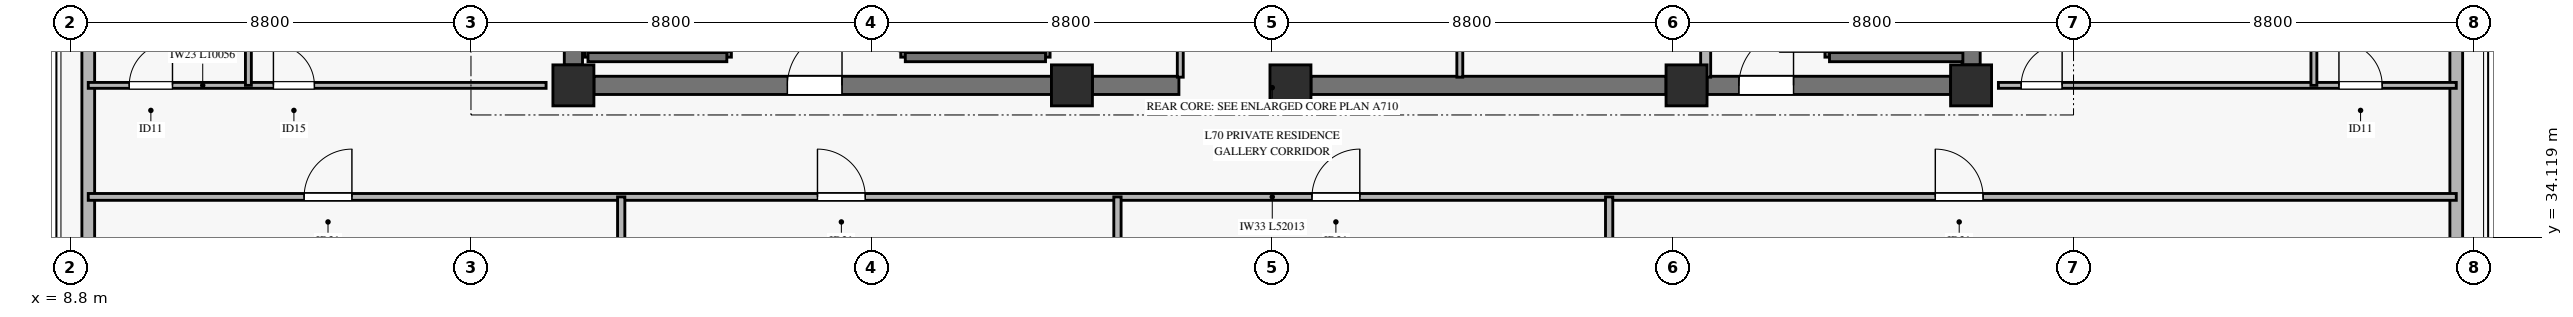
"""IFC4 building model, lengths in metres.
Left out: names, types, materials, properties, quantities, classifications, styles, units other than length and angle.
Written with IfcOpenShell. Run it as: python <this file> out.ifc"""

import sys

from ifc_helpers import new_model, si_unit, direction, frame, frame_2d, origin, origin_2d, place, context, subcontext, project, spatial, rectangle, extrude, source, transform, mapped, element, fill, save


model = new_model("IFC4")
c1 = context("Model", 3, precision=1e-05, world=origin(), true_north=direction((0.0, 1.0)))
c2 = subcontext(c1, "Body", "Model", "MODEL_VIEW")
j1 = project(units=[si_unit("LENGTHUNIT", "METRE"), si_unit("PLANEANGLEUNIT", "RADIAN")], contexts=[c1])
p1 = place(None, origin())
s1 = spatial("IfcSite", under=j1, at=p1, CompositionType="ELEMENT")
p2 = place(p1, origin())
s2 = spatial("IfcBuilding", under=s1, at=p2, CompositionType="ELEMENT")
p3 = place(p2, frame((0.0, 0.0, 272.3)))
s3 = spatial("IfcBuildingStorey", under=s2, at=p3, CompositionType="ELEMENT", Elevation=272.3)
m1 = source(origin(), c2, "Body", "SweptSolid", [
    extrude(rectangle(XDim=0.9, YDim=0.9, at=origin_2d()), origin(), (0.0, 0.0, 1.0), 3.185),
])
for number, where, z_axis, x_axis in (
    (1, (19.85, 37.45, 0.0), (0.0, 0.0, 1.0), (1.0, 0.0, 0.0)),
    (2, (30.8, 37.45, 0.0), (0.0, 0.0, 1.0), (1.0, 0.0, 0.0)),
    (3, (35.6, 37.45, 0.0), (0.0, 0.0, 1.0), (1.0, 0.0, 0.0)),
    (4, (44.3, 37.45, 0.0), (0.0, 0.0, 1.0), (1.0, 0.0, 0.0)),
    (5, (50.55, 37.45, 0.0), (0.0, 0.0, 1.0), (1.0, 0.0, 0.0)),
):
    element("IfcColumn", number, at=place(p3, frame(where, z_axis=z_axis, x_axis=x_axis)), inside=s3, PredefinedType="PILASTER", context=c2, shape_type="MappedRepresentation", body=[
        mapped(m1, transform((0.0, 0.0, 0.0), x_axis=(1.0, 0.0, 0.0), y_axis=(0.0, 1.0, 0.0), z_axis=(0.0, 0.0, 1.0), scale=1.0)),
    ])
p4 = place(p3, frame((20.3, 37.45, 0.0), z_axis=(0.0, 0.0, 1.0), x_axis=(1.0, 0.0, 0.0)))
e6 = element("IfcWall", 6, at=p4, inside=s3, PredefinedType="SHEAR", context=c2, shape_type="SweptSolid", body=[
    extrude(rectangle(XDim=10.05, YDim=0.4, at=frame_2d((5.025, 0.0))), origin(), (0.0, 0.0, 1.0), 3.185),
])
p5 = place(p4, frame((4.25, 0.0, 0.0)))
e7 = element("IfcOpeningElement", 7, at=p5, cuts=e6, PredefinedType="OPENING", context=c2, shape_type="SweptSolid", body=[
    extrude(rectangle(XDim=1.2, YDim=2.15, at=frame_2d((0.6, 1.075))), frame((0.0, 0.21, 0.0), z_axis=(0.0, -1.0, 0.0), x_axis=(1.0, 0.0, 0.0)), (0.0, 0.0, 1.0), 0.42),
])
p6 = place(p3, frame((31.25, 37.45, 0.0), z_axis=(0.0, 0.0, 1.0), x_axis=(1.0, 0.0, 0.0)))
e8 = element("IfcWall", 8, at=p6, inside=s3, PredefinedType="SHEAR", context=c2, shape_type="SweptSolid", body=[
    extrude(rectangle(XDim=1.9, YDim=0.4, at=frame_2d((0.95, 0.0))), origin(), (0.0, 0.0, 1.0), 3.185),
])
p7 = place(p3, frame((36.05, 37.45, 0.0), z_axis=(0.0, 0.0, 1.0), x_axis=(1.0, 0.0, 0.0)))
e9 = element("IfcWall", 9, at=p7, inside=s3, PredefinedType="SHEAR", context=c2, shape_type="SweptSolid", body=[
    extrude(rectangle(XDim=7.8, YDim=0.4, at=frame_2d((3.9, 0.0))), origin(), (0.0, 0.0, 1.0), 3.185),
])
p8 = place(p3, frame((44.75, 37.45, 0.0), z_axis=(0.0, 0.0, 1.0), x_axis=(1.0, 0.0, 0.0)))
e10 = element("IfcWall", 10, at=p8, inside=s3, PredefinedType="SHEAR", context=c2, shape_type="SweptSolid", body=[
    extrude(rectangle(XDim=5.35, YDim=0.4, at=frame_2d((2.675, 0.0))), origin(), (0.0, 0.0, 1.0), 3.185),
])
p9 = place(p8, frame((0.7, 0.0, 0.0)))
e11 = element("IfcOpeningElement", 11, at=p9, cuts=e10, PredefinedType="OPENING", context=c2, shape_type="SweptSolid", body=[
    extrude(rectangle(XDim=1.2, YDim=2.15, at=frame_2d((0.6, 1.075))), frame((0.0, 0.21, 0.0), z_axis=(0.0, -1.0, 0.0), x_axis=(1.0, 0.0, 0.0)), (0.0, 0.0, 1.0), 0.42),
])
for number, where, z_axis, x_axis in (
    (12, (19.85, 37.9, 0.0), (0.0, 0.0, 1.0), (0.0, 1.0, 0.0)),
    (13, (50.55, 37.9, 0.0), (0.0, 0.0, 1.0), (0.0, 1.0, 0.0)),
):
    element("IfcWall", number, at=place(p3, frame(where, z_axis=z_axis, x_axis=x_axis)), inside=s3, PredefinedType="SHEAR", context=c2, shape_type="SweptSolid", body=[
        extrude(rectangle(XDim=8.2, YDim=0.4, at=frame_2d((4.1, 0.0))), origin(), (0.0, 0.0, 1.0), 3.185),
    ])
p10 = place(p3, frame((9.194, 31.763, 0.0), z_axis=(0.0, 0.0, 1.0), x_axis=(0.0, 1.0, 0.0)))
e14 = element("IfcWall", 14, at=p10, inside=s3, PredefinedType="SOLIDWALL", context=c2, shape_type="SweptSolid", body=[
    extrude(rectangle(XDim=11.814, YDim=0.28, at=frame_2d((5.907, 0.0))), origin(), (0.0, 0.0, 1.0), 2.815),
])
p11 = place(p10, frame((7.049, 0.0, 0.45)))
e15 = element("IfcOpeningElement", 15, at=p11, cuts=e14, PredefinedType="OPENING", context=c2, shape_type="SweptSolid", body=[
    extrude(rectangle(XDim=2.2, YDim=2.1, at=frame_2d((1.1, 1.05))), frame((0.0, 0.15, 0.0), z_axis=(0.0, -1.0, 0.0), x_axis=(1.0, 0.0, 0.0)), (0.0, 0.0, 1.0), 0.3),
])
p12 = place(p3, frame((61.207, 31.763, 0.0), z_axis=(0.0, 0.0, 1.0), x_axis=(0.0, 1.0, 0.0)))
e16 = element("IfcWall", 16, at=p12, inside=s3, PredefinedType="SOLIDWALL", context=c2, shape_type="SweptSolid", body=[
    extrude(rectangle(XDim=11.814, YDim=0.28, at=frame_2d((5.907, 0.0))), origin(), (0.0, 0.0, 1.0), 2.815),
])
p13 = place(p12, frame((7.049, 0.0, 0.45)))
e17 = element("IfcOpeningElement", 17, at=p13, cuts=e16, PredefinedType="OPENING", context=c2, shape_type="SweptSolid", body=[
    extrude(rectangle(XDim=2.2, YDim=2.1, at=frame_2d((1.1, 1.05))), frame((0.0, 0.15, 0.0), z_axis=(0.0, -1.0, 0.0), x_axis=(1.0, 0.0, 0.0)), (0.0, 0.0, 1.0), 0.3),
])
p14 = place(p3, frame((20.17, 38.07, 0.0), z_axis=(0.0, 0.0, 1.0), x_axis=(0.0, 1.0, 0.0)))
e18 = element("IfcWall", 18, at=p14, inside=s3, PredefinedType="SOLIDWALL", context=c2, shape_type="SweptSolid", body=[
    extrude(rectangle(XDim=7.25, YDim=0.14, at=frame_2d((3.625, 0.0))), origin(), (0.0, 0.0, 1.0), 3.4),
])
p15 = place(p3, frame((23.22, 38.07, 0.0), z_axis=(0.0, 0.0, 1.0), x_axis=(0.0, 1.0, 0.0)))
e19 = element("IfcWall", 19, at=p15, inside=s3, PredefinedType="SOLIDWALL", context=c2, shape_type="SweptSolid", body=[
    extrude(rectangle(XDim=7.25, YDim=0.2, at=frame_2d((3.625, 0.0))), origin(), (0.0, 0.0, 1.0), 3.4),
])
p16 = place(p15, frame((0.11, 0.0, 0.0)))
e20 = element("IfcOpeningElement", 20, at=p16, cuts=e19, PredefinedType="OPENING", context=c2, shape_type="SweptSolid", body=[
    extrude(rectangle(XDim=1.1, YDim=2.15, at=frame_2d((0.55, 1.075))), frame((0.0, 0.11, 0.0), z_axis=(0.0, -1.0, 0.0), x_axis=(1.0, 0.0, 0.0)), (0.0, 0.0, 1.0), 0.22),
])
p17 = place(p3, frame((20.17, 38.07, 0.0), z_axis=(0.0, 0.0, 1.0), x_axis=(1.0, 0.0, 0.0)))
e21 = element("IfcWall", 21, at=p17, inside=s3, PredefinedType="SOLIDWALL", context=c2, shape_type="SweptSolid", body=[
    extrude(rectangle(XDim=3.05, YDim=0.2, at=frame_2d((1.525, 0.0))), origin(), (0.0, 0.0, 1.0), 3.4),
])
p18 = place(p3, frame((27.14, 38.07, 0.0), z_axis=(0.0, 0.0, 1.0), x_axis=(0.0, 1.0, 0.0)))
e22 = element("IfcWall", 22, at=p18, inside=s3, PredefinedType="SOLIDWALL", context=c2, shape_type="SweptSolid", body=[
    extrude(rectangle(XDim=7.25, YDim=0.2, at=frame_2d((3.625, 0.0))), origin(), (0.0, 0.0, 1.0), 3.4),
])
p19 = place(p18, frame((0.11, 0.0, 0.0)))
e23 = element("IfcOpeningElement", 23, at=p19, cuts=e22, PredefinedType="OPENING", context=c2, shape_type="SweptSolid", body=[
    extrude(rectangle(XDim=1.1, YDim=2.15, at=frame_2d((0.55, 1.075))), frame((0.0, 0.11, 0.0), z_axis=(0.0, -1.0, 0.0), x_axis=(1.0, 0.0, 0.0)), (0.0, 0.0, 1.0), 0.22),
])
p20 = place(p3, frame((30.22, 38.07, 0.0), z_axis=(0.0, 0.0, 1.0), x_axis=(0.0, 1.0, 0.0)))
e24 = element("IfcWall", 24, at=p20, inside=s3, PredefinedType="SOLIDWALL", context=c2, shape_type="SweptSolid", body=[
    extrude(rectangle(XDim=7.25, YDim=0.2, at=frame_2d((3.625, 0.0))), origin(), (0.0, 0.0, 1.0), 3.4),
])
p21 = place(p3, frame((27.14, 38.07, 0.0), z_axis=(0.0, 0.0, 1.0), x_axis=(1.0, 0.0, 0.0)))
e25 = element("IfcWall", 25, at=p21, inside=s3, PredefinedType="SOLIDWALL", context=c2, shape_type="SweptSolid", body=[
    extrude(rectangle(XDim=3.08, YDim=0.2, at=frame_2d((1.54, 0.0))), origin(), (0.0, 0.0, 1.0), 3.4),
])
p22 = place(p3, frame((47.44, 38.07, 0.0), z_axis=(0.0, 0.0, 1.0), x_axis=(0.0, 1.0, 0.0)))
e26 = element("IfcWall", 26, at=p22, inside=s3, PredefinedType="SOLIDWALL", context=c2, shape_type="SweptSolid", body=[
    extrude(rectangle(XDim=7.25, YDim=0.2, at=frame_2d((3.625, 0.0))), origin(), (0.0, 0.0, 1.0), 3.4),
])
p23 = place(p22, frame((0.11, 0.0, 0.0)))
e27 = element("IfcOpeningElement", 27, at=p23, cuts=e26, PredefinedType="OPENING", context=c2, shape_type="SweptSolid", body=[
    extrude(rectangle(XDim=1.1, YDim=2.15, at=frame_2d((0.55, 1.075))), frame((0.0, 0.11, 0.0), z_axis=(0.0, -1.0, 0.0), x_axis=(1.0, 0.0, 0.0)), (0.0, 0.0, 1.0), 0.22),
])
p24 = place(p3, frame((47.44, 38.07, 0.0), z_axis=(0.0, 0.0, 1.0), x_axis=(1.0, 0.0, 0.0)))
e28 = element("IfcWall", 28, at=p24, inside=s3, PredefinedType="SOLIDWALL", context=c2, shape_type="SweptSolid", body=[
    extrude(rectangle(XDim=2.93, YDim=0.2, at=frame_2d((1.465, 0.0))), origin(), (0.0, 0.0, 1.0), 3.4),
])
p25 = place(p3, frame((44.72, 37.63, 0.0), z_axis=(0.0, 0.0, 1.0), x_axis=(0.0, 1.0, 0.0)))
e29 = element("IfcWall", 29, at=p25, inside=s3, PredefinedType="SOLIDWALL", context=c2, shape_type="SweptSolid", body=[
    extrude(rectangle(XDim=7.59, YDim=0.22, at=frame_2d((3.795, 0.0))), origin(), (0.0, 0.0, 1.0), 3.185),
])
p26 = place(p3, frame((33.18, 37.63, 0.0), z_axis=(0.0, 0.0, 1.0), x_axis=(0.0, 1.0, 0.0)))
e30 = element("IfcWall", 30, at=p26, inside=s3, PredefinedType="PARTITIONING", context=c2, shape_type="SweptSolid", body=[
    extrude(rectangle(XDim=6.52, YDim=0.13, at=frame_2d((3.26, 0.0))), origin(), (0.0, 0.0, 1.0), 2.27),
])
p27 = place(p26, frame((2.27, 0.0, 0.0)))
e31 = element("IfcOpeningElement", 31, at=p27, cuts=e30, PredefinedType="OPENING", context=c2, shape_type="SweptSolid", body=[
    extrude(rectangle(XDim=0.9, YDim=2.1, at=frame_2d((0.45, 1.05))), frame((0.0, 0.075, 0.0), z_axis=(0.0, -1.0, 0.0), x_axis=(1.0, 0.0, 0.0)), (0.0, 0.0, 1.0), 0.15),
])
p28 = place(p3, frame((39.32, 37.63, 0.0), z_axis=(0.0, 0.0, 1.0), x_axis=(0.0, 1.0, 0.0)))
e32 = element("IfcWall", 32, at=p28, inside=s3, PredefinedType="PARTITIONING", context=c2, shape_type="SweptSolid", body=[
    extrude(rectangle(XDim=8.74, YDim=0.13, at=frame_2d((4.37, 0.0))), origin(), (0.0, 0.0, 1.0), 3.185),
])
p29 = place(p28, frame((4.89, 0.0, 0.0)))
e33 = element("IfcOpeningElement", 33, at=p29, cuts=e32, PredefinedType="OPENING", context=c2, shape_type="SweptSolid", body=[
    extrude(rectangle(XDim=0.9, YDim=2.1, at=frame_2d((0.45, 1.05))), frame((0.0, 0.075, 0.0), z_axis=(0.0, -1.0, 0.0), x_axis=(1.0, 0.0, 0.0)), (0.0, 0.0, 1.0), 0.15),
])
p30 = place(p3, frame((9.194, 35.0, 0.0), z_axis=(0.0, 0.0, 1.0), x_axis=(1.0, 0.0, 0.0)))
e34 = element("IfcWall", 34, at=p30, inside=s3, PredefinedType="PARTITIONING", context=c2, shape_type="SweptSolid", body=[
    extrude(rectangle(XDim=52.013, YDim=0.15, at=frame_2d((26.006, 0.0))), origin(), (0.0, 0.0, 1.0), 2.47),
])
p31 = place(p30, frame((4.741, 0.0, 0.0)))
e35 = element("IfcOpeningElement", 35, at=p31, cuts=e34, PredefinedType="OPENING", context=c2, shape_type="SweptSolid", body=[
    extrude(rectangle(XDim=1.05, YDim=2.15, at=frame_2d((0.525, 1.075))), frame((0.0, 0.085, 0.0), z_axis=(0.0, -1.0, 0.0), x_axis=(1.0, 0.0, 0.0)), (0.0, 0.0, 1.0), 0.17),
])
p32 = place(p30, frame((16.017, 0.0, 0.0)))
e36 = element("IfcOpeningElement", 36, at=p32, cuts=e34, PredefinedType="OPENING", context=c2, shape_type="SweptSolid", body=[
    extrude(rectangle(XDim=1.05, YDim=2.15, at=frame_2d((0.525, 1.075))), frame((0.0, 0.085, 0.0), z_axis=(0.0, -1.0, 0.0), x_axis=(1.0, 0.0, 0.0)), (0.0, 0.0, 1.0), 0.17),
])
p33 = place(p30, frame((26.879, 0.0, 0.0)))
e37 = element("IfcOpeningElement", 37, at=p33, cuts=e34, PredefinedType="OPENING", context=c2, shape_type="SweptSolid", body=[
    extrude(rectangle(XDim=1.05, YDim=2.15, at=frame_2d((0.525, 1.075))), frame((0.0, 0.085, 0.0), z_axis=(0.0, -1.0, 0.0), x_axis=(1.0, 0.0, 0.0)), (0.0, 0.0, 1.0), 0.17),
])
p34 = place(p30, frame((40.57, 0.0, 0.0)))
e38 = element("IfcOpeningElement", 38, at=p34, cuts=e34, PredefinedType="OPENING", context=c2, shape_type="SweptSolid", body=[
    extrude(rectangle(XDim=1.05, YDim=2.15, at=frame_2d((0.525, 1.075))), frame((0.0, 0.085, 0.0), z_axis=(0.0, -1.0, 0.0), x_axis=(1.0, 0.0, 0.0)), (0.0, 0.0, 1.0), 0.17),
])
for number, where, z_axis, x_axis in (
    (39, (20.9, 16.976, 0.0), (0.0, 0.0, 1.0), (0.0, 1.0, 0.0)),
    (40, (31.8, 16.976, 0.0), (0.0, 0.0, 1.0), (0.0, 1.0, 0.0)),
    (41, (42.6, 16.976, 0.0), (0.0, 0.0, 1.0), (0.0, 1.0, 0.0)),
):
    element("IfcWall", number, at=place(p3, frame(where, z_axis=z_axis, x_axis=x_axis)), inside=s3, PredefinedType="PARTITIONING", context=c2, shape_type="SweptSolid", body=[
        extrude(rectangle(XDim=18.024, YDim=0.16, at=frame_2d((9.012, 0.0))), origin(), (0.0, 0.0, 1.0), 2.77),
    ])
p35 = place(p3, frame((9.194, 37.45, 0.0), z_axis=(0.0, 0.0, 1.0), x_axis=(1.0, 0.0, 0.0)))
e42 = element("IfcWall", 42, at=p35, inside=s3, PredefinedType="PARTITIONING", context=c2, shape_type="SweptSolid", body=[
    extrude(rectangle(XDim=10.056, YDim=0.13, at=frame_2d((5.028, 0.0))), origin(), (0.0, 0.0, 1.0), 2.82),
])
p36 = place(p35, frame((0.9, 0.0, 0.0)))
e43 = element("IfcOpeningElement", 43, at=p36, cuts=e42, PredefinedType="OPENING", context=c2, shape_type="SweptSolid", body=[
    extrude(rectangle(XDim=0.95, YDim=2.1, at=frame_2d((0.475, 1.05))), frame((0.0, 0.075, 0.0), z_axis=(0.0, -1.0, 0.0), x_axis=(1.0, 0.0, 0.0)), (0.0, 0.0, 1.0), 0.15),
])
p37 = place(p35, frame((4.067, 0.0, 0.0)))
e44 = element("IfcOpeningElement", 44, at=p37, cuts=e42, PredefinedType="OPENING", context=c2, shape_type="SweptSolid", body=[
    extrude(rectangle(XDim=0.9, YDim=2.1, at=frame_2d((0.45, 1.05))), frame((0.0, 0.075, 0.0), z_axis=(0.0, -1.0, 0.0), x_axis=(1.0, 0.0, 0.0)), (0.0, 0.0, 1.0), 0.15),
])
p38 = place(p3, frame((12.711, 37.45, 0.0), z_axis=(0.0, 0.0, 1.0), x_axis=(0.0, 1.0, 0.0)))
e45 = element("IfcWall", 45, at=p38, inside=s3, PredefinedType="PARTITIONING", context=c2, shape_type="SweptSolid", body=[
    extrude(rectangle(XDim=8.8, YDim=0.13, at=frame_2d((4.4, 0.0))), origin(), (0.0, 0.0, 1.0), 3.185),
])
p39 = place(p3, frame((51.15, 37.45, 0.0), z_axis=(0.0, 0.0, 1.0), x_axis=(1.0, 0.0, 0.0)))
e46 = element("IfcWall", 46, at=p39, inside=s3, PredefinedType="PARTITIONING", context=c2, shape_type="SweptSolid", body=[
    extrude(rectangle(XDim=10.057, YDim=0.13, at=frame_2d((5.029, 0.0))), origin(), (0.0, 0.0, 1.0), 2.82),
])
p40 = place(p39, frame((0.5, 0.0, 0.0)))
e47 = element("IfcOpeningElement", 47, at=p40, cuts=e46, PredefinedType="OPENING", context=c2, shape_type="SweptSolid", body=[
    extrude(rectangle(XDim=0.9, YDim=2.1, at=frame_2d((0.45, 1.05))), frame((0.0, 0.075, 0.0), z_axis=(0.0, -1.0, 0.0), x_axis=(1.0, 0.0, 0.0)), (0.0, 0.0, 1.0), 0.15),
])
p41 = place(p39, frame((7.48, 0.0, 0.0)))
e48 = element("IfcOpeningElement", 48, at=p41, cuts=e46, PredefinedType="OPENING", context=c2, shape_type="SweptSolid", body=[
    extrude(rectangle(XDim=0.95, YDim=2.1, at=frame_2d((0.475, 1.05))), frame((0.0, 0.075, 0.0), z_axis=(0.0, -1.0, 0.0), x_axis=(1.0, 0.0, 0.0)), (0.0, 0.0, 1.0), 0.15),
])
p42 = place(p3, frame((58.08, 37.45, 0.0), z_axis=(0.0, 0.0, 1.0), x_axis=(0.0, 1.0, 0.0)))
e49 = element("IfcWall", 49, at=p42, inside=s3, PredefinedType="PARTITIONING", context=c2, shape_type="SweptSolid", body=[
    extrude(rectangle(XDim=8.8, YDim=0.13, at=frame_2d((4.4, 0.0))), origin(), (0.0, 0.0, 1.0), 3.185),
])
m2 = source(origin(), c2, "Body", "SweptSolid", [
    extrude(rectangle(XDim=1.2, YDim=2.15, at=frame_2d((0.6, 1.075))), frame((0.0, 0.025, 0.0), z_axis=(0.0, -1.0, 0.0), x_axis=(1.0, 0.0, 0.0)), (0.0, 0.0, 1.0), 0.05),
])
p43 = place(p5, origin())
e50 = element("IfcDoor", 50, at=p43, inside=s3, OperationType="SINGLE_SWING_RIGHT", PredefinedType="DOOR", context=c2, shape_type="MappedRepresentation", body=[
    mapped(m2, transform((0.0, 0.0, 0.0), x_axis=(1.0, 0.0, 0.0), y_axis=(0.0, 1.0, 0.0), z_axis=(0.0, 0.0, 1.0), scale=1.0)),
])
fill(e7, e50)
p44 = place(p9, origin())
e51 = element("IfcDoor", 51, at=p44, inside=s3, OperationType="SINGLE_SWING_RIGHT", PredefinedType="DOOR", context=c2, shape_type="MappedRepresentation", body=[
    mapped(m2, transform((0.0, 0.0, 0.0), x_axis=(1.0, 0.0, 0.0), y_axis=(0.0, 1.0, 0.0), z_axis=(0.0, 0.0, 1.0), scale=1.0)),
])
fill(e11, e51)
m3 = source(origin(), c2, "Body", "SweptSolid", [
    extrude(rectangle(XDim=1.05, YDim=2.15, at=frame_2d((0.525, 1.075))), frame((0.0, 0.025, 0.0), z_axis=(0.0, -1.0, 0.0), x_axis=(1.0, 0.0, 0.0)), (0.0, 0.0, 1.0), 0.05),
])
p45 = place(p31, origin())
e52 = element("IfcDoor", 52, at=p45, inside=s3, OperationType="SINGLE_SWING_RIGHT", PredefinedType="DOOR", context=c2, shape_type="MappedRepresentation", body=[
    mapped(m3, transform((0.0, 0.0, 0.0), x_axis=(1.0, 0.0, 0.0), y_axis=(0.0, 1.0, 0.0), z_axis=(0.0, 0.0, 1.0), scale=1.0)),
])
fill(e35, e52)
p46 = place(p32, origin())
e53 = element("IfcDoor", 53, at=p46, inside=s3, OperationType="SINGLE_SWING_LEFT", PredefinedType="DOOR", context=c2, shape_type="MappedRepresentation", body=[
    mapped(m3, transform((0.0, 0.0, 0.0), x_axis=(1.0, 0.0, 0.0), y_axis=(0.0, 1.0, 0.0), z_axis=(0.0, 0.0, 1.0), scale=1.0)),
])
fill(e36, e53)
p47 = place(p33, origin())
e54 = element("IfcDoor", 54, at=p47, inside=s3, OperationType="SINGLE_SWING_RIGHT", PredefinedType="DOOR", context=c2, shape_type="MappedRepresentation", body=[
    mapped(m3, transform((0.0, 0.0, 0.0), x_axis=(1.0, 0.0, 0.0), y_axis=(0.0, 1.0, 0.0), z_axis=(0.0, 0.0, 1.0), scale=1.0)),
])
fill(e37, e54)
p48 = place(p34, origin())
e55 = element("IfcDoor", 55, at=p48, inside=s3, OperationType="SINGLE_SWING_LEFT", PredefinedType="DOOR", context=c2, shape_type="MappedRepresentation", body=[
    mapped(m3, transform((0.0, 0.0, 0.0), x_axis=(1.0, 0.0, 0.0), y_axis=(0.0, 1.0, 0.0), z_axis=(0.0, 0.0, 1.0), scale=1.0)),
])
fill(e38, e55)
m4 = source(origin(), c2, "Body", "SweptSolid", [
    extrude(rectangle(XDim=0.95, YDim=2.1, at=frame_2d((0.475, 1.05))), frame((0.0, 0.025, 0.0), z_axis=(0.0, -1.0, 0.0), x_axis=(1.0, 0.0, 0.0)), (0.0, 0.0, 1.0), 0.05),
])
p49 = place(p36, origin())
e56 = element("IfcDoor", 56, at=p49, inside=s3, OperationType="SINGLE_SWING_RIGHT", PredefinedType="DOOR", context=c2, shape_type="MappedRepresentation", body=[
    mapped(m4, transform((0.0, 0.0, 0.0), x_axis=(1.0, 0.0, 0.0), y_axis=(0.0, 1.0, 0.0), z_axis=(0.0, 0.0, 1.0), scale=1.0)),
])
fill(e43, e56)
m5 = source(origin(), c2, "Body", "SweptSolid", [
    extrude(rectangle(XDim=0.9, YDim=2.1, at=frame_2d((0.45, 1.05))), frame((0.0, 0.025, 0.0), z_axis=(0.0, -1.0, 0.0), x_axis=(1.0, 0.0, 0.0)), (0.0, 0.0, 1.0), 0.05),
])
p50 = place(p37, origin())
e57 = element("IfcDoor", 57, at=p50, inside=s3, OperationType="SINGLE_SWING_LEFT", PredefinedType="DOOR", context=c2, shape_type="MappedRepresentation", body=[
    mapped(m5, transform((0.0, 0.0, 0.0), x_axis=(1.0, 0.0, 0.0), y_axis=(0.0, 1.0, 0.0), z_axis=(0.0, 0.0, 1.0), scale=1.0)),
])
fill(e44, e57)
p51 = place(p40, origin())
e58 = element("IfcDoor", 58, at=p51, inside=s3, OperationType="SINGLE_SWING_RIGHT", PredefinedType="DOOR", context=c2, shape_type="MappedRepresentation", body=[
    mapped(m5, transform((0.0, 0.0, 0.0), x_axis=(1.0, 0.0, 0.0), y_axis=(0.0, 1.0, 0.0), z_axis=(0.0, 0.0, 1.0), scale=1.0)),
])
fill(e47, e58)
p52 = place(p41, origin())
e59 = element("IfcDoor", 59, at=p52, inside=s3, OperationType="SINGLE_SWING_LEFT", PredefinedType="DOOR", context=c2, shape_type="MappedRepresentation", body=[
    mapped(m4, transform((0.0, 0.0, 0.0), x_axis=(1.0, 0.0, 0.0), y_axis=(0.0, 1.0, 0.0), z_axis=(0.0, 0.0, 1.0), scale=1.0)),
])
fill(e48, e59)
save(model, sys.argv[1])
